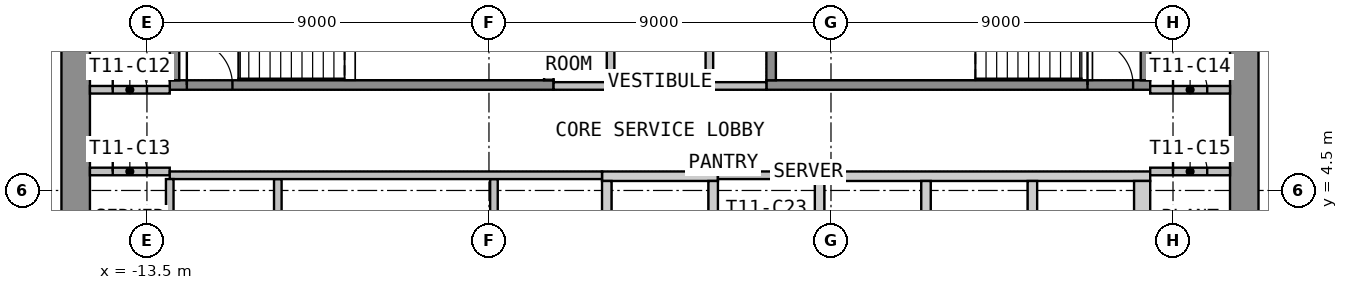
"""IFC4 building model, lengths in metres.
Left out: names, types, materials, properties, quantities, classifications, styles, units other than length and angle.
Written with IfcOpenShell. Run it as: python <this file> out.ifc"""

import sys

from ifc_helpers import new_model, si_unit, direction, frame, frame_2d, origin, place, context, subcontext, project, spatial, polyline, rectangle, outline, extrude, element, fill, save


model = new_model("IFC4")
c1 = context("Model", 3, precision=1e-05, world=origin(), true_north=direction((0.0, 1.0)))
c2 = subcontext(c1, "Body", "Model", "MODEL_VIEW")
j1 = project(units=[si_unit("LENGTHUNIT", "METRE"), si_unit("PLANEANGLEUNIT", "RADIAN")], contexts=[c1])
p1 = place(None, origin())
s1 = spatial("IfcSite", under=j1, at=p1, CompositionType="ELEMENT")
p2 = place(p1, origin())
s2 = spatial("IfcBuilding", under=s1, at=p2, CompositionType="ELEMENT")
p3 = place(p2, frame((0.0, 0.0, 156.0)))
s3 = spatial("IfcBuildingStorey", under=s2, at=p3, CompositionType="ELEMENT", Elevation=156.0)
p4 = place(p3, frame((-15.375, -12.75, 0.0), z_axis=(0.0, 0.0, 1.0), x_axis=(0.0, 1.0, 0.0)))
e1 = element("IfcWall", 1, at=p4, inside=s3, PredefinedType="SHEAR", context=c2, shape_type="SweptSolid", body=[
    extrude(rectangle(XDim=25.5, YDim=0.75, at=frame_2d((12.75, 0.0))), origin(), (0.0, 0.0, 1.0), 3.575),
])
p5 = place(p4, frame((11.55, 0.0, 0.0)))
e2 = element("IfcOpeningElement", 2, at=p5, cuts=e1, PredefinedType="OPENING", context=c2, shape_type="SweptSolid", body=[
    extrude(rectangle(XDim=2.4, YDim=2.1, at=frame_2d((1.2, 1.05))), frame((0.0, 0.385, 0.0), z_axis=(0.0, -1.0, 0.0), x_axis=(1.0, 0.0, 0.0)), (0.0, 0.0, 1.0), 0.77),
])
p6 = place(p3, frame((15.375, -12.75, 0.0), z_axis=(0.0, 0.0, 1.0), x_axis=(0.0, 1.0, 0.0)))
e3 = element("IfcWall", 3, at=p6, inside=s3, PredefinedType="SHEAR", context=c2, shape_type="SweptSolid", body=[
    extrude(rectangle(XDim=25.5, YDim=0.75, at=frame_2d((12.75, 0.0))), origin(), (0.0, 0.0, 1.0), 3.575),
])
p7 = place(p6, frame((11.55, 0.0, 0.0)))
e4 = element("IfcOpeningElement", 4, at=p7, cuts=e3, PredefinedType="OPENING", context=c2, shape_type="SweptSolid", body=[
    extrude(rectangle(XDim=2.4, YDim=2.1, at=frame_2d((1.2, 1.05))), frame((0.0, 0.385, 0.0), z_axis=(0.0, -1.0, 0.0), x_axis=(1.0, 0.0, 0.0)), (0.0, 0.0, 1.0), 0.77),
])
p8 = place(p3, origin())
e5 = element("IfcWall", 5, at=p8, inside=s3, PredefinedType="SHEAR", context=c2, shape_type="SweptSolid", body=[
    extrude(outline(polyline([(-1.525, 4.75), (1.525, 4.75), (1.525, 5.0), (-1.525, 5.0), (-1.525, 4.75)])), origin(), (0.0, 0.0, 1.0), 3.575),
])
p9 = place(p3, origin())
e6 = element("IfcWall", 6, at=p9, inside=s3, PredefinedType="SHEAR", context=c2, shape_type="SweptSolid", body=[
    extrude(outline(polyline([(4.075, 4.75), (12.9, 4.75), (12.9, 5.0), (4.075, 5.0), (4.075, 4.75)])), origin(), (0.0, 0.0, 1.0), 3.575),
])
p10 = place(p3, origin())
e7 = element("IfcWall", 7, at=p10, inside=s3, PredefinedType="SHEAR", context=c2, shape_type="SweptSolid", body=[
    extrude(outline(polyline([(-1.525, 2.05), (-1.275, 2.05), (-1.275, 4.75), (-1.525, 4.75), (-1.525, 2.05)])), origin(), (0.0, 0.0, 1.0), 3.575),
])
p11 = place(p3, origin())
e8 = element("IfcWall", 8, at=p11, inside=s3, PredefinedType="SHEAR", context=c2, shape_type="SweptSolid", body=[
    extrude(outline(polyline([(1.275, 2.05), (1.525, 2.05), (1.525, 4.75), (1.275, 4.75), (1.275, 2.05)])), origin(), (0.0, 0.0, 1.0), 3.575),
])
p12 = place(p3, origin())
e9 = element("IfcWall", 9, at=p12, inside=s3, PredefinedType="SHEAR", context=c2, shape_type="SweptSolid", body=[
    extrude(outline(polyline([(9.675, 2.05), (9.925, 2.05), (9.925, 4.75), (9.675, 4.75), (9.675, 2.05)])), origin(), (0.0, 0.0, 1.0), 3.575),
])
p13 = place(p3, origin())
e10 = element("IfcWall", 10, at=p13, inside=s3, PredefinedType="SHEAR", context=c2, shape_type="SweptSolid", body=[
    extrude(outline(polyline([(12.475, 2.05), (12.9, 2.05), (12.9, 4.75), (12.475, 4.75), (12.475, 2.05)])), origin(), (0.0, 0.0, 1.0), 3.575),
])
p14 = place(p3, origin())
e11 = element("IfcWall", 11, at=p14, inside=s3, PredefinedType="SHEAR", context=c2, shape_type="SweptSolid", body=[
    extrude(outline(polyline([(4.075, 3.05), (4.325, 3.05), (4.325, 4.75), (4.075, 4.75), (4.075, 3.05)])), origin(), (0.0, 0.0, 1.0), 3.575),
])
p15 = place(p3, origin())
e12 = element("IfcWall", 12, at=p15, inside=s3, PredefinedType="SHEAR", context=c2, shape_type="SweptSolid", body=[
    extrude(outline(polyline([(6.875, 3.05), (7.125, 3.05), (7.125, 4.75), (6.875, 4.75), (6.875, 3.05)])), origin(), (0.0, 0.0, 1.0), 3.575),
])
p16 = place(p3, frame((-12.9, 7.275, 0.0), z_axis=(0.0, 0.0, 1.0), x_axis=(1.0, 0.0, 0.0)))
e13 = element("IfcWall", 13, at=p16, inside=s3, PredefinedType="SHEAR", context=c2, shape_type="SweptSolid", body=[
    extrude(rectangle(XDim=10.1, YDim=0.25, at=frame_2d((5.05, 0.0))), origin(), (0.0, 0.0, 1.0), 3.575),
])
p17 = place(p16, frame((0.45, 0.0, 0.0)))
e14 = element("IfcOpeningElement", 14, at=p17, cuts=e13, PredefinedType="OPENING", context=c2, shape_type="SweptSolid", body=[
    extrude(rectangle(XDim=1.2, YDim=2.1, at=frame_2d((0.6, 1.05))), frame((0.0, 0.135, 0.0), z_axis=(0.0, -1.0, 0.0), x_axis=(1.0, 0.0, 0.0)), (0.0, 0.0, 1.0), 0.27),
])
for number, where, z_axis, x_axis in (
    (15, (-12.775, 7.4, 0.0), (0.0, 0.0, 1.0), (0.0, 1.0, 0.0)),
    (16, (-2.925, 7.4, 0.0), (0.0, 0.0, 1.0), (0.0, 1.0, 0.0)),
):
    element("IfcWall", number, at=place(p3, frame(where, z_axis=z_axis, x_axis=x_axis)), inside=s3, PredefinedType="SHEAR", context=c2, shape_type="SweptSolid", body=[
        extrude(rectangle(XDim=3.25, YDim=0.25, at=frame_2d((1.625, 0.0))), origin(), (0.0, 0.0, 1.0), 3.575),
    ])
p18 = place(p3, frame((2.8, 7.275, 0.0), z_axis=(0.0, 0.0, 1.0), x_axis=(1.0, 0.0, 0.0)))
e17 = element("IfcWall", 17, at=p18, inside=s3, PredefinedType="SHEAR", context=c2, shape_type="SweptSolid", body=[
    extrude(rectangle(XDim=10.1, YDim=0.25, at=frame_2d((5.05, 0.0))), origin(), (0.0, 0.0, 1.0), 3.575),
])
p19 = place(p18, frame((8.45, 0.0, 0.0)))
e18 = element("IfcOpeningElement", 18, at=p19, cuts=e17, PredefinedType="OPENING", context=c2, shape_type="SweptSolid", body=[
    extrude(rectangle(XDim=1.2, YDim=2.1, at=frame_2d((0.6, 1.05))), frame((0.0, 0.135, 0.0), z_axis=(0.0, -1.0, 0.0), x_axis=(1.0, 0.0, 0.0)), (0.0, 0.0, 1.0), 0.27),
])
for number, where, z_axis, x_axis in (
    (19, (2.925, 7.4, 0.0), (0.0, 0.0, 1.0), (0.0, 1.0, 0.0)),
    (20, (12.775, 7.4, 0.0), (0.0, 0.0, 1.0), (0.0, 1.0, 0.0)),
):
    element("IfcWall", number, at=place(p3, frame(where, z_axis=z_axis, x_axis=x_axis)), inside=s3, PredefinedType="SHEAR", context=c2, shape_type="SweptSolid", body=[
        extrude(rectangle(XDim=3.25, YDim=0.25, at=frame_2d((1.625, 0.0))), origin(), (0.0, 0.0, 1.0), 3.575),
    ])
for number, where, z_axis, x_axis in (
    (21, (-2.8, 7.25, 0.0), (0.0, 0.0, 1.0), (1.0, 0.0, 0.0)),
    (22, (1.4, 7.25, 0.0), (0.0, 0.0, 1.0), (1.0, 0.0, 0.0)),
):
    element("IfcWall", number, at=place(p3, frame(where, z_axis=z_axis, x_axis=x_axis)), inside=s3, PredefinedType="PARTITIONING", context=c2, shape_type="SweptSolid", body=[
        extrude(rectangle(XDim=1.4, YDim=0.2, at=frame_2d((0.7, 0.0))), origin(), (0.0, 0.0, 1.0), 3.575),
    ])
p20 = place(p3, frame((-1.3, 7.15, 0.0), z_axis=(0.0, 0.0, 1.0), x_axis=(0.0, 1.0, 0.0)))
e23 = element("IfcWall", 23, at=p20, inside=s3, PredefinedType="PARTITIONING", context=c2, shape_type="SweptSolid", body=[
    extrude(rectangle(XDim=5.6, YDim=0.2, at=frame_2d((2.8, 0.0))), origin(), (0.0, 0.0, 1.0), 3.575),
])
p21 = place(p20, frame((1.1, 0.0, 0.0)))
e24 = element("IfcOpeningElement", 24, at=p21, cuts=e23, PredefinedType="OPENING", context=c2, shape_type="SweptSolid", body=[
    extrude(rectangle(XDim=0.9, YDim=2.1, at=frame_2d((0.45, 1.05))), frame((0.0, 0.11, 0.0), z_axis=(0.0, -1.0, 0.0), x_axis=(1.0, 0.0, 0.0)), (0.0, 0.0, 1.0), 0.22),
])
p22 = place(p20, frame((3.8, 0.0, 0.0)))
e25 = element("IfcOpeningElement", 25, at=p22, cuts=e23, PredefinedType="OPENING", context=c2, shape_type="SweptSolid", body=[
    extrude(rectangle(XDim=0.9, YDim=2.1, at=frame_2d((0.45, 1.05))), frame((0.0, 0.11, 0.0), z_axis=(0.0, -1.0, 0.0), x_axis=(1.0, 0.0, 0.0)), (0.0, 0.0, 1.0), 0.22),
])
p23 = place(p3, frame((1.3, 7.15, 0.0), z_axis=(0.0, 0.0, 1.0), x_axis=(0.0, 1.0, 0.0)))
e26 = element("IfcWall", 26, at=p23, inside=s3, PredefinedType="PARTITIONING", context=c2, shape_type="SweptSolid", body=[
    extrude(rectangle(XDim=5.6, YDim=0.2, at=frame_2d((2.8, 0.0))), origin(), (0.0, 0.0, 1.0), 3.575),
])
p24 = place(p23, frame((1.1, 0.0, 0.0)))
e27 = element("IfcOpeningElement", 27, at=p24, cuts=e26, PredefinedType="OPENING", context=c2, shape_type="SweptSolid", body=[
    extrude(rectangle(XDim=0.9, YDim=2.1, at=frame_2d((0.45, 1.05))), frame((0.0, 0.11, 0.0), z_axis=(0.0, -1.0, 0.0), x_axis=(1.0, 0.0, 0.0)), (0.0, 0.0, 1.0), 0.22),
])
p25 = place(p23, frame((3.8, 0.0, 0.0)))
e28 = element("IfcOpeningElement", 28, at=p25, cuts=e26, PredefinedType="OPENING", context=c2, shape_type="SweptSolid", body=[
    extrude(rectangle(XDim=0.9, YDim=2.1, at=frame_2d((0.45, 1.05))), frame((0.0, 0.11, 0.0), z_axis=(0.0, -1.0, 0.0), x_axis=(1.0, 0.0, 0.0)), (0.0, 0.0, 1.0), 0.22),
])
p26 = place(p3, frame((-15.0, 7.15, 0.0), z_axis=(0.0, 0.0, 1.0), x_axis=(1.0, 0.0, 0.0)))
e29 = element("IfcWall", 29, at=p26, inside=s3, PredefinedType="PARTITIONING", context=c2, shape_type="SweptSolid", body=[
    extrude(rectangle(XDim=2.1, YDim=0.2, at=frame_2d((1.05, 0.0))), origin(), (0.0, 0.0, 1.0), 3.575),
])
p27 = place(p26, frame((0.6, 0.0, 0.0)))
e30 = element("IfcOpeningElement", 30, at=p27, cuts=e29, PredefinedType="OPENING", context=c2, shape_type="SweptSolid", body=[
    extrude(rectangle(XDim=0.9, YDim=2.1, at=frame_2d((0.45, 1.05))), frame((0.0, 0.11, 0.0), z_axis=(0.0, -1.0, 0.0), x_axis=(1.0, 0.0, 0.0)), (0.0, 0.0, 1.0), 0.22),
])
p28 = place(p3, frame((-15.0, 5.0, 0.0), z_axis=(0.0, 0.0, 1.0), x_axis=(1.0, 0.0, 0.0)))
e31 = element("IfcWall", 31, at=p28, inside=s3, PredefinedType="PARTITIONING", context=c2, shape_type="SweptSolid", body=[
    extrude(rectangle(XDim=2.1, YDim=0.2, at=frame_2d((1.05, 0.0))), origin(), (0.0, 0.0, 1.0), 3.575),
])
p29 = place(p28, frame((0.6, 0.0, 0.0)))
e32 = element("IfcOpeningElement", 32, at=p29, cuts=e31, PredefinedType="OPENING", context=c2, shape_type="SweptSolid", body=[
    extrude(rectangle(XDim=0.9, YDim=2.1, at=frame_2d((0.45, 1.05))), frame((0.0, 0.11, 0.0), z_axis=(0.0, -1.0, 0.0), x_axis=(1.0, 0.0, 0.0)), (0.0, 0.0, 1.0), 0.22),
])
p30 = place(p3, frame((12.9, 7.15, 0.0), z_axis=(0.0, 0.0, 1.0), x_axis=(1.0, 0.0, 0.0)))
e33 = element("IfcWall", 33, at=p30, inside=s3, PredefinedType="PARTITIONING", context=c2, shape_type="SweptSolid", body=[
    extrude(rectangle(XDim=2.1, YDim=0.2, at=frame_2d((1.05, 0.0))), origin(), (0.0, 0.0, 1.0), 3.575),
])
p31 = place(p30, frame((0.6, 0.0, 0.0)))
e34 = element("IfcOpeningElement", 34, at=p31, cuts=e33, PredefinedType="OPENING", context=c2, shape_type="SweptSolid", body=[
    extrude(rectangle(XDim=0.9, YDim=2.1, at=frame_2d((0.45, 1.05))), frame((0.0, 0.11, 0.0), z_axis=(0.0, -1.0, 0.0), x_axis=(1.0, 0.0, 0.0)), (0.0, 0.0, 1.0), 0.22),
])
p32 = place(p3, frame((12.9, 5.0, 0.0), z_axis=(0.0, 0.0, 1.0), x_axis=(1.0, 0.0, 0.0)))
e35 = element("IfcWall", 35, at=p32, inside=s3, PredefinedType="PARTITIONING", context=c2, shape_type="SweptSolid", body=[
    extrude(rectangle(XDim=2.1, YDim=0.2, at=frame_2d((1.05, 0.0))), origin(), (0.0, 0.0, 1.0), 3.575),
])
p33 = place(p32, frame((0.6, 0.0, 0.0)))
e36 = element("IfcOpeningElement", 36, at=p33, cuts=e35, PredefinedType="OPENING", context=c2, shape_type="SweptSolid", body=[
    extrude(rectangle(XDim=0.9, YDim=2.1, at=frame_2d((0.45, 1.05))), frame((0.0, 0.11, 0.0), z_axis=(0.0, -1.0, 0.0), x_axis=(1.0, 0.0, 0.0)), (0.0, 0.0, 1.0), 0.22),
])
for number, where, z_axis, x_axis in (
    (37, (-10.056, 2.0, 0.0), (0.0, 0.0, 1.0), (0.0, 1.0, 0.0)),
    (38, (-4.369, 2.0, 0.0), (0.0, 0.0, 1.0), (0.0, 1.0, 0.0)),
):
    element("IfcWall", number, at=place(p3, frame(where, z_axis=z_axis, x_axis=x_axis)), inside=s3, PredefinedType="PARTITIONING", context=c2, shape_type="SweptSolid", body=[
        extrude(rectangle(XDim=2.8, YDim=0.2, at=frame_2d((1.4, 0.0))), origin(), (0.0, 0.0, 1.0), 3.575),
    ])
p34 = place(p3, frame((-12.9, 4.9, 0.0), z_axis=(0.0, 0.0, 1.0), x_axis=(1.0, 0.0, 0.0)))
e39 = element("IfcWall", 39, at=p34, inside=s3, PredefinedType="PARTITIONING", context=c2, shape_type="SweptSolid", body=[
    extrude(rectangle(XDim=11.375, YDim=0.2, at=frame_2d((5.688, 0.0))), origin(), (0.0, 0.0, 1.0), 3.575),
])
p35 = place(p3, frame((-12.9, 2.0, 0.0), z_axis=(0.0, 0.0, 1.0), x_axis=(0.0, 1.0, 0.0)))
e40 = element("IfcWall", 40, at=p35, inside=s3, PredefinedType="PARTITIONING", context=c2, shape_type="SweptSolid", body=[
    extrude(rectangle(XDim=2.8, YDim=0.2, at=frame_2d((1.4, 0.0))), origin(), (0.0, 0.0, 1.0), 3.575),
])
p36 = place(p3, frame((1.525, 4.9, 0.0), z_axis=(0.0, 0.0, 1.0), x_axis=(1.0, 0.0, 0.0)))
e41 = element("IfcWall", 41, at=p36, inside=s3, PredefinedType="PARTITIONING", context=c2, shape_type="SweptSolid", body=[
    extrude(rectangle(XDim=2.55, YDim=0.2, at=frame_2d((1.275, 0.0))), origin(), (0.0, 0.0, 1.0), 3.575),
])
p37 = place(p17, origin())
e42 = element("IfcDoor", 42, at=p37, inside=s3, OperationType="SINGLE_SWING_LEFT", PredefinedType="DOOR", context=c2, shape_type="SweptSolid", body=[
    extrude(rectangle(XDim=1.2, YDim=2.1, at=frame_2d((0.6, 1.05))), frame((0.0, 0.025, 0.0), z_axis=(0.0, -1.0, 0.0), x_axis=(1.0, 0.0, 0.0)), (0.0, 0.0, 1.0), 0.05),
])
fill(e14, e42)
p38 = place(p19, origin())
e43 = element("IfcDoor", 43, at=p38, inside=s3, OperationType="SINGLE_SWING_LEFT", PredefinedType="DOOR", context=c2, shape_type="SweptSolid", body=[
    extrude(rectangle(XDim=1.2, YDim=2.1, at=frame_2d((0.6, 1.05))), frame((0.0, 0.025, 0.0), z_axis=(0.0, -1.0, 0.0), x_axis=(1.0, 0.0, 0.0)), (0.0, 0.0, 1.0), 0.05),
])
fill(e18, e43)
p39 = place(p27, origin())
e44 = element("IfcDoor", 44, at=p39, inside=s3, OperationType="SINGLE_SWING_LEFT", PredefinedType="DOOR", context=c2, shape_type="SweptSolid", body=[
    extrude(rectangle(XDim=0.9, YDim=2.1, at=frame_2d((0.45, 1.05))), frame((0.0, 0.025, 0.0), z_axis=(0.0, -1.0, 0.0), x_axis=(1.0, 0.0, 0.0)), (0.0, 0.0, 1.0), 0.05),
])
fill(e30, e44)
p40 = place(p29, origin())
e45 = element("IfcDoor", 45, at=p40, inside=s3, OperationType="SINGLE_SWING_LEFT", PredefinedType="DOOR", context=c2, shape_type="SweptSolid", body=[
    extrude(rectangle(XDim=0.9, YDim=2.1, at=frame_2d((0.45, 1.05))), frame((0.0, 0.025, 0.0), z_axis=(0.0, -1.0, 0.0), x_axis=(1.0, 0.0, 0.0)), (0.0, 0.0, 1.0), 0.05),
])
fill(e32, e45)
p41 = place(p31, origin())
e46 = element("IfcDoor", 46, at=p41, inside=s3, OperationType="SINGLE_SWING_LEFT", PredefinedType="DOOR", context=c2, shape_type="SweptSolid", body=[
    extrude(rectangle(XDim=0.9, YDim=2.1, at=frame_2d((0.45, 1.05))), frame((0.0, 0.025, 0.0), z_axis=(0.0, -1.0, 0.0), x_axis=(1.0, 0.0, 0.0)), (0.0, 0.0, 1.0), 0.05),
])
fill(e34, e46)
p42 = place(p33, origin())
e47 = element("IfcDoor", 47, at=p42, inside=s3, OperationType="SINGLE_SWING_LEFT", PredefinedType="DOOR", context=c2, shape_type="SweptSolid", body=[
    extrude(rectangle(XDim=0.9, YDim=2.1, at=frame_2d((0.45, 1.05))), frame((0.0, 0.025, 0.0), z_axis=(0.0, -1.0, 0.0), x_axis=(1.0, 0.0, 0.0)), (0.0, 0.0, 1.0), 0.05),
])
fill(e36, e47)
save(model, sys.argv[1])
